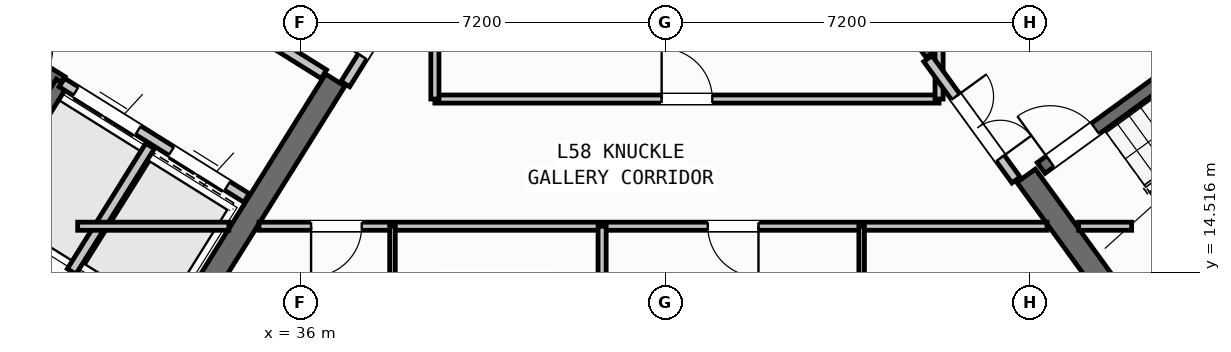
"""IFC4 building model, lengths in metres.
Left out: names, types, materials, properties, quantities, classifications, styles, units other than length and angle.
Written with IfcOpenShell. Run it as: python <this file> out.ifc"""

import sys

from ifc_helpers import new_model, si_unit, direction, frame, frame_2d, origin, place, context, subcontext, project, spatial, rectangle, extrude, source, transform, mapped, element, fill, save


model = new_model("IFC4")
c1 = context("Model", 3, precision=1e-05, world=origin(), true_north=direction((0.0, 1.0)))
c2 = subcontext(c1, "Body", "Model", "MODEL_VIEW")
j1 = project(units=[si_unit("LENGTHUNIT", "METRE"), si_unit("PLANEANGLEUNIT", "RADIAN")], contexts=[c1])
p1 = place(None, origin())
s1 = spatial("IfcSite", under=j1, at=p1, CompositionType="ELEMENT")
p2 = place(p1, origin())
s2 = spatial("IfcBuilding", under=s1, at=p2, CompositionType="ELEMENT")
p3 = place(p2, frame((0.0, 0.0, 229.2)))
s3 = spatial("IfcBuildingStorey", under=s2, at=p3, CompositionType="ELEMENT", Elevation=229.2)
p4 = place(p3, frame((33.324, 12.503, 0.0), z_axis=(0.0, 0.0, 1.0), x_axis=(-0.848043529849, 0.529926571782, 0.0)))
e1 = element("IfcWall", 1, at=p4, inside=s3, PredefinedType="SHEAR", context=c2, shape_type="SweptSolid", body=[
    extrude(rectangle(XDim=13.04, YDim=0.45, at=frame_2d((6.52, 0.0))), origin(), (0.0, 0.0, 1.0), 4.22),
])
p5 = place(p3, frame((36.683, 18.304, 0.0), z_axis=(0.0, 0.0, 1.0), x_axis=(-0.529904039071, -0.848057609704, 0.0)))
e2 = element("IfcWall", 2, at=p5, inside=s3, PredefinedType="SHEAR", context=c2, shape_type="SweptSolid", body=[
    extrude(rectangle(XDim=6.475, YDim=0.45, at=frame_2d((3.238, 0.0))), origin(), (0.0, 0.0, 1.0), 4.22),
])
p6 = place(p3, frame((52.399, 13.169, 0.0), z_axis=(0.0, 0.0, 1.0), x_axis=(0.809022352778, 0.587777877013, 0.0)))
e3 = element("IfcWall", 3, at=p6, inside=s3, PredefinedType="SHEAR", context=c2, shape_type="SweptSolid", body=[
    extrude(rectangle(XDim=12.24, YDim=0.45, at=frame_2d((6.12, 0.0))), origin(), (0.0, 0.0, 1.0), 4.22),
])
p7 = place(p3, frame((52.449, 13.483, 0.0), z_axis=(0.0, 0.0, 1.0), x_axis=(-0.587819244441, 0.808992296542, 0.0)))
e4 = element("IfcWall", 4, at=p7, inside=s3, PredefinedType="SHEAR", context=c2, shape_type="SweptSolid", body=[
    extrude(rectangle(XDim=3.625, YDim=0.45, at=frame_2d((1.812, 0.0))), origin(), (0.0, 0.0, 1.0), 4.22),
])
p8 = place(p3, frame((48.526, 18.884, 0.0), z_axis=(0.0, 0.0, 1.0), x_axis=(-0.587774812919, 0.809024578921, 0.0)))
e5 = element("IfcWall", 5, at=p8, inside=s3, PredefinedType="SHEAR", context=c2, shape_type="SweptSolid", body=[
    extrude(rectangle(XDim=6.475, YDim=0.45, at=frame_2d((3.238, 0.0))), origin(), (0.0, 0.0, 1.0), 4.22),
])
p9 = place(p3, frame((31.76, 12.183, 0.0), z_axis=(0.0, 0.0, 1.0), x_axis=(-0.848047074256, 0.529920899612, 0.0)))
e6 = element("IfcWall", 6, at=p9, inside=s3, PredefinedType="STANDARD", context=c2, shape_type="SweptSolid", body=[
    extrude(rectangle(XDim=30.652, YDim=0.32, at=frame_2d((15.326, 0.0))), origin(), (0.0, 0.0, 1.0), 4.22),
])
p10 = place(p9, frame((14.966, 0.0, 0.0)))
e7 = element("IfcOpeningElement", 7, at=p10, cuts=e6, PredefinedType="OPENING", context=c2, shape_type="SweptSolid", body=[
    extrude(rectangle(XDim=1.2, YDim=2.15, at=frame_2d((0.6, 1.075))), frame((0.0, 0.17, 0.0), z_axis=(0.0, -1.0, 0.0), x_axis=(1.0, 0.0, 0.0)), (0.0, 0.0, 1.0), 0.34),
])
p11 = place(p9, frame((2.096, 0.0, 0.9)))
e8 = element("IfcOpeningElement", 8, at=p11, cuts=e6, PredefinedType="OPENING", context=c2, shape_type="SweptSolid", body=[
    extrude(rectangle(XDim=1.65, YDim=1.45, at=frame_2d((0.825, 0.725))), frame((0.0, 0.17, 0.0), z_axis=(0.0, -1.0, 0.0), x_axis=(1.0, 0.0, 0.0)), (0.0, 0.0, 1.0), 0.34),
])
p12 = place(p9, frame((6.771, 0.0, 0.9)))
e9 = element("IfcOpeningElement", 9, at=p12, cuts=e6, PredefinedType="OPENING", context=c2, shape_type="SweptSolid", body=[
    extrude(rectangle(XDim=1.65, YDim=1.45, at=frame_2d((0.825, 0.725))), frame((0.0, 0.17, 0.0), z_axis=(0.0, -1.0, 0.0), x_axis=(1.0, 0.0, 0.0)), (0.0, 0.0, 1.0), 0.34),
])
p13 = place(p9, frame((20.283, 0.0, 0.95)))
e10 = element("IfcOpeningElement", 10, at=p13, cuts=e6, PredefinedType="OPENING", context=c2, shape_type="SweptSolid", body=[
    extrude(rectangle(XDim=1.95, YDim=1.35, at=frame_2d((0.975, 0.675))), frame((0.0, 0.17, 0.0), z_axis=(0.0, -1.0, 0.0), x_axis=(1.0, 0.0, 0.0)), (0.0, 0.0, 1.0), 0.34),
])
p14 = place(p9, frame((27.208, 0.0, 1.0)))
e11 = element("IfcOpeningElement", 11, at=p14, cuts=e6, PredefinedType="OPENING", context=c2, shape_type="SweptSolid", body=[
    extrude(rectangle(XDim=0.9, YDim=1.25, at=frame_2d((0.45, 0.625))), frame((0.0, 0.17, 0.0), z_axis=(0.0, -1.0, 0.0), x_axis=(1.0, 0.0, 0.0)), (0.0, 0.0, 1.0), 0.34),
])
p15 = place(p3, frame((31.28, 18.261, 0.0), z_axis=(0.0, 0.0, 1.0), x_axis=(-0.848051618787, 0.529913626805, 0.0)))
e12 = element("IfcWall", 12, at=p15, inside=s3, PredefinedType="SHEAR", context=c2, shape_type="SweptSolid", body=[
    extrude(rectangle(XDim=7.46, YDim=0.26, at=frame_2d((3.73, 0.0))), origin(), (0.0, 0.0, 1.0), 4.22),
])
p16 = place(p15, frame((0.36, 0.0, 0.0)))
e13 = element("IfcOpeningElement", 13, at=p16, cuts=e12, PredefinedType="OPENING", context=c2, shape_type="SweptSolid", body=[
    extrude(rectangle(XDim=0.86, YDim=2.05, at=frame_2d((0.43, 1.025))), frame((0.0, 0.14, 0.0), z_axis=(0.0, -1.0, 0.0), x_axis=(1.0, 0.0, 0.0)), (0.0, 0.0, 1.0), 0.28),
])
p17 = place(p3, frame((31.288, 18.256, 0.0), z_axis=(0.0, 0.0, 1.0), x_axis=(-0.529943379326, -0.848033026897, 0.0)))
e14 = element("IfcWall", 14, at=p17, inside=s3, PredefinedType="SHEAR", context=c2, shape_type="SweptSolid", body=[
    extrude(rectangle(XDim=3.16, YDim=0.26, at=frame_2d((1.58, 0.0))), origin(), (0.0, 0.0, 1.0), 4.22),
])
p18 = place(p3, frame((34.933, 15.978, 0.0), z_axis=(0.0, 0.0, 1.0), x_axis=(-0.848055739377, 0.529907032327, 0.0)))
e15 = element("IfcWall", 15, at=p18, inside=s3, PredefinedType="STANDARD", context=c2, shape_type="SweptSolid", body=[
    extrude(rectangle(XDim=4.298, YDim=0.2, at=frame_2d((2.149, 0.0))), origin(), (0.0, 0.0, 1.0), 4.21),
])
p19 = place(p18, frame((0.448, 0.0, 0.0)))
e16 = element("IfcOpeningElement", 16, at=p19, cuts=e15, PredefinedType="OPENING", context=c2, shape_type="SweptSolid", body=[
    extrude(rectangle(XDim=1.3, YDim=2.2, at=frame_2d((0.65, 1.1))), frame((0.0, 0.11, 0.0), z_axis=(0.0, -1.0, 0.0), x_axis=(1.0, 0.0, 0.0)), (0.0, 0.0, 1.0), 0.22),
])
p20 = place(p18, frame((2.523, 0.0, 0.0)))
e17 = element("IfcOpeningElement", 17, at=p20, cuts=e15, PredefinedType="OPENING", context=c2, shape_type="SweptSolid", body=[
    extrude(rectangle(XDim=1.45, YDim=2.25, at=frame_2d((0.725, 1.125))), frame((0.0, 0.11, 0.0), z_axis=(0.0, -1.0, 0.0), x_axis=(1.0, 0.0, 0.0)), (0.0, 0.0, 1.0), 0.22),
])
p21 = place(p3, frame((36.459, 18.421, 0.0), z_axis=(0.0, 0.0, 1.0), x_axis=(-0.848059591691, 0.529900867089, 0.0)))
e18 = element("IfcWall", 18, at=p21, inside=s3, PredefinedType="STANDARD", context=c2, shape_type="SweptSolid", body=[
    extrude(rectangle(XDim=5.818, YDim=0.2, at=frame_2d((2.909, 0.0))), origin(), (0.0, 0.0, 1.0), 4.21),
])
p22 = place(p21, frame((2.598, 0.0, 0.0)))
e19 = element("IfcOpeningElement", 19, at=p22, cuts=e18, PredefinedType="OPENING", context=c2, shape_type="SweptSolid", body=[
    extrude(rectangle(XDim=1.15, YDim=2.1, at=frame_2d((0.575, 1.05))), frame((0.0, 0.11, 0.0), z_axis=(0.0, -1.0, 0.0), x_axis=(1.0, 0.0, 0.0)), (0.0, 0.0, 1.0), 0.22),
])
p23 = place(p3, frame((33.029, 17.003, 0.0), z_axis=(0.0, 0.0, 1.0), x_axis=(-0.529916267533, -0.848049968695, 0.0)))
e20 = element("IfcWall", 20, at=p23, inside=s3, PredefinedType="STANDARD", context=c2, shape_type="SweptSolid", body=[
    extrude(rectangle(XDim=2.92, YDim=0.2, at=frame_2d((1.46, 0.0))), origin(), (0.0, 0.0, 1.0), 4.21),
])
p24 = place(p3, frame((52.472, 14.013, 0.0), z_axis=(0.0, 0.0, 1.0), x_axis=(0.809028366311, 0.587769599847, 0.0)))
e21 = element("IfcWall", 21, at=p24, inside=s3, PredefinedType="SHEAR", context=c2, shape_type="SweptSolid", body=[
    extrude(rectangle(XDim=7.33, YDim=0.26, at=frame_2d((3.665, 0.0))), origin(), (0.0, 0.0, 1.0), 4.22),
])
p25 = place(p3, frame((50.615, 16.57, 0.0), z_axis=(0.0, 0.0, 1.0), x_axis=(0.809028366311, 0.587769599847, 0.0)))
e22 = element("IfcWall", 22, at=p25, inside=s3, PredefinedType="SHEAR", context=c2, shape_type="SweptSolid", body=[
    extrude(rectangle(XDim=7.33, YDim=0.26, at=frame_2d((3.665, 0.0))), origin(), (0.0, 0.0, 1.0), 4.22),
])
p26 = place(p25, frame((0.22, 0.0, 0.0)))
e23 = element("IfcOpeningElement", 23, at=p26, cuts=e22, PredefinedType="OPENING", context=c2, shape_type="SweptSolid", body=[
    extrude(rectangle(XDim=1.1, YDim=2.1, at=frame_2d((0.55, 1.05))), frame((0.0, 0.14, 0.0), z_axis=(0.0, -1.0, 0.0), x_axis=(1.0, 0.0, 0.0)), (0.0, 0.0, 1.0), 0.28),
])
p27 = place(p3, frame((38.451, 20.737, 0.0), z_axis=(0.0, 0.0, 1.0), x_axis=(-0.529924799939, -0.848044637038, 0.0)))
e24 = element("IfcWall", 24, at=p27, inside=s3, PredefinedType="STANDARD", context=c2, shape_type="SweptSolid", body=[
    extrude(rectangle(XDim=2.96, YDim=0.2, at=frame_2d((1.48, 0.0))), origin(), (0.0, 0.0, 1.0), 2.395),
])
p28 = place(p27, frame((1.46, 0.0, 0.0)))
e25 = element("IfcOpeningElement", 25, at=p28, cuts=e24, PredefinedType="OPENING", context=c2, shape_type="SweptSolid", body=[
    extrude(rectangle(XDim=0.86, YDim=2.05, at=frame_2d((0.43, 1.025))), frame((0.0, 0.11, 0.0), z_axis=(0.0, -1.0, 0.0), x_axis=(1.0, 0.0, 0.0)), (0.0, 0.0, 1.0), 0.22),
])
p29 = place(p3, frame((31.6, 15.42, 0.0), z_axis=(0.0, 0.0, 1.0), x_axis=(1.0, 0.0, 0.0)))
e26 = element("IfcWall", 26, at=p29, inside=s3, PredefinedType="PARTITIONING", context=c2, shape_type="SweptSolid", body=[
    extrude(rectangle(XDim=2.984, YDim=0.16, at=frame_2d((1.492, 0.0))), origin(), (0.0, 0.0, 1.0), 4.21),
])
p30 = place(p3, frame((35.178, 15.42, 0.0), z_axis=(0.0, 0.0, 1.0), x_axis=(1.0, 0.0, 0.0)))
e27 = element("IfcWall", 27, at=p30, inside=s3, PredefinedType="PARTITIONING", context=c2, shape_type="SweptSolid", body=[
    extrude(rectangle(XDim=15.552, YDim=0.16, at=frame_2d((7.776, 0.0))), origin(), (0.0, 0.0, 1.0), 4.21),
])
p31 = place(p30, frame((1.028, 0.0, 0.0)))
e28 = element("IfcOpeningElement", 28, at=p31, cuts=e27, PredefinedType="OPENING", context=c2, shape_type="SweptSolid", body=[
    extrude(rectangle(XDim=1.0, YDim=2.1, at=frame_2d((0.5, 1.05))), frame((0.0, 0.09, 0.0), z_axis=(0.0, -1.0, 0.0), x_axis=(1.0, 0.0, 0.0)), (0.0, 0.0, 1.0), 0.18),
])
p32 = place(p30, frame((8.858, 0.0, 0.0)))
e29 = element("IfcOpeningElement", 29, at=p32, cuts=e27, PredefinedType="OPENING", context=c2, shape_type="SweptSolid", body=[
    extrude(rectangle(XDim=1.0, YDim=2.1, at=frame_2d((0.5, 1.05))), frame((0.0, 0.09, 0.0), z_axis=(0.0, -1.0, 0.0), x_axis=(1.0, 0.0, 0.0)), (0.0, 0.0, 1.0), 0.18),
])
p33 = place(p3, frame((51.354, 15.42, 0.0), z_axis=(0.0, 0.0, 1.0), x_axis=(1.0, 0.0, 0.0)))
e30 = element("IfcWall", 30, at=p33, inside=s3, PredefinedType="PARTITIONING", context=c2, shape_type="SweptSolid", body=[
    extrude(rectangle(XDim=1.046, YDim=0.16, at=frame_2d((0.523, 0.0))), origin(), (0.0, 0.0, 1.0), 4.21),
])
p34 = place(p3, frame((38.65, 17.93, 0.0), z_axis=(0.0, 0.0, 1.0), x_axis=(1.0, 0.0, 0.0)))
e31 = element("IfcWall", 31, at=p34, inside=s3, PredefinedType="PARTITIONING", context=c2, shape_type="SweptSolid", body=[
    extrude(rectangle(XDim=9.95, YDim=0.16, at=frame_2d((4.975, 0.0))), origin(), (0.0, 0.0, 1.0), 4.21),
])
p35 = place(p34, frame((4.475, 0.0, 0.0)))
e32 = element("IfcOpeningElement", 32, at=p35, cuts=e31, PredefinedType="OPENING", context=c2, shape_type="SweptSolid", body=[
    extrude(rectangle(XDim=1.0, YDim=2.1, at=frame_2d((0.5, 1.05))), frame((0.0, 0.09, 0.0), z_axis=(0.0, -1.0, 0.0), x_axis=(1.0, 0.0, 0.0)), (0.0, 0.0, 1.0), 0.18),
])
p36 = place(p3, frame((38.65, 17.93, 0.0), z_axis=(0.0, 0.0, 1.0), x_axis=(0.0, 1.0, 0.0)))
e33 = element("IfcWall", 33, at=p36, inside=s3, PredefinedType="PARTITIONING", context=c2, shape_type="SweptSolid", body=[
    extrude(rectangle(XDim=3.046, YDim=0.16, at=frame_2d((1.523, 0.0))), origin(), (0.0, 0.0, 1.0), 4.21),
])
p37 = place(p3, frame((48.6, 17.93, 0.0), z_axis=(0.0, 0.0, 1.0), x_axis=(0.0, 1.0, 0.0)))
e34 = element("IfcWall", 34, at=p37, inside=s3, PredefinedType="PARTITIONING", context=c2, shape_type="SweptSolid", body=[
    extrude(rectangle(XDim=0.993, YDim=0.16, at=frame_2d((0.496, 0.0))), origin(), (0.0, 0.0, 1.0), 4.21),
])
p38 = place(p3, frame((50.119, 16.333, 0.0), z_axis=(0.0, 0.0, 1.0), x_axis=(-0.587749856981, 0.809042709391, 0.0)))
e35 = element("IfcWall", 35, at=p38, inside=s3, PredefinedType="STANDARD", context=c2, shape_type="SweptSolid", body=[
    extrude(rectangle(XDim=2.96, YDim=0.2, at=frame_2d((1.48, 0.0))), origin(), (0.0, 0.0, 1.0), 2.395),
])
p39 = place(p38, frame((0.53, 0.0, 0.0)))
e36 = element("IfcOpeningElement", 36, at=p39, cuts=e35, PredefinedType="OPENING", context=c2, shape_type="SweptSolid", body=[
    extrude(rectangle(XDim=1.5, YDim=2.15, at=frame_2d((0.75, 1.075))), frame((0.0, 0.11, 0.0), z_axis=(0.0, -1.0, 0.0), x_axis=(1.0, 0.0, 0.0)), (0.0, 0.0, 1.0), 0.22),
])
p40 = place(p3, frame((41.95, 1.96, 0.0), z_axis=(0.0, 0.0, 1.0), x_axis=(0.0, 1.0, 0.0)))
e37 = element("IfcWall", 37, at=p40, inside=s3, PredefinedType="PARTITIONING", context=c2, shape_type="SweptSolid", body=[
    extrude(rectangle(XDim=13.46, YDim=0.16, at=frame_2d((6.73, 0.0))), origin(), (0.0, 0.0, 1.0), 4.21),
])
p41 = place(p3, frame((37.813, 1.96, 0.0), z_axis=(0.0, 0.0, 1.0), x_axis=(0.0, 1.0, 0.0)))
e38 = element("IfcWall", 38, at=p41, inside=s3, PredefinedType="PARTITIONING", context=c2, shape_type="SweptSolid", body=[
    extrude(rectangle(XDim=13.46, YDim=0.11, at=frame_2d((6.73, 0.0))), origin(), (0.0, 0.0, 1.0), 4.21),
])
p42 = place(p41, frame((5.5, 0.0, 0.0)))
e39 = element("IfcOpeningElement", 39, at=p42, cuts=e38, PredefinedType="OPENING", context=c2, shape_type="SweptSolid", body=[
    extrude(rectangle(XDim=0.92, YDim=2.08, at=frame_2d((0.46, 1.04))), frame((0.0, 0.065, 0.0), z_axis=(0.0, -1.0, 0.0), x_axis=(1.0, 0.0, 0.0)), (0.0, 0.0, 1.0), 0.13),
])
p43 = place(p41, frame((10.45, 0.0, 0.0)))
e40 = element("IfcOpeningElement", 40, at=p43, cuts=e38, PredefinedType="OPENING", context=c2, shape_type="SweptSolid", body=[
    extrude(rectangle(XDim=0.88, YDim=2.08, at=frame_2d((0.44, 1.04))), frame((0.0, 0.065, 0.0), z_axis=(0.0, -1.0, 0.0), x_axis=(1.0, 0.0, 0.0)), (0.0, 0.0, 1.0), 0.13),
])
p44 = place(p3, frame((47.072, 1.96, 0.0), z_axis=(0.0, 0.0, 1.0), x_axis=(0.0, 1.0, 0.0)))
e41 = element("IfcWall", 41, at=p44, inside=s3, PredefinedType="PARTITIONING", context=c2, shape_type="SweptSolid", body=[
    extrude(rectangle(XDim=13.46, YDim=0.11, at=frame_2d((6.73, 0.0))), origin(), (0.0, 0.0, 1.0), 4.21),
])
p45 = place(p44, frame((6.6, 0.0, 0.0)))
e42 = element("IfcOpeningElement", 42, at=p45, cuts=e41, PredefinedType="OPENING", context=c2, shape_type="SweptSolid", body=[
    extrude(rectangle(XDim=0.92, YDim=2.08, at=frame_2d((0.46, 1.04))), frame((0.0, 0.065, 0.0), z_axis=(0.0, -1.0, 0.0), x_axis=(1.0, 0.0, 0.0)), (0.0, 0.0, 1.0), 0.13),
])
p46 = place(p44, frame((11.1, 0.0, 0.0)))
e43 = element("IfcOpeningElement", 43, at=p46, cuts=e41, PredefinedType="OPENING", context=c2, shape_type="SweptSolid", body=[
    extrude(rectangle(XDim=0.88, YDim=2.08, at=frame_2d((0.44, 1.04))), frame((0.0, 0.065, 0.0), z_axis=(0.0, -1.0, 0.0), x_axis=(1.0, 0.0, 0.0)), (0.0, 0.0, 1.0), 0.13),
])
m1 = source(origin(), c2, "Body", "SweptSolid", [
    extrude(rectangle(XDim=1.3, YDim=2.2, at=frame_2d((0.65, 1.1))), frame((0.0, 0.025, 0.0), z_axis=(0.0, -1.0, 0.0), x_axis=(1.0, 0.0, 0.0)), (0.0, 0.0, 1.0), 0.05),
])
p47 = place(p19, origin())
e44 = element("IfcDoor", 44, at=p47, inside=s3, OperationType="DOUBLE_DOOR_SLIDING", PredefinedType="DOOR", context=c2, shape_type="MappedRepresentation", body=[
    mapped(m1, transform((0.0, 0.0, 0.0), scale=1.0)),
])
fill(e16, e44)
m2 = source(origin(), c2, "Body", "SweptSolid", [
    extrude(rectangle(XDim=1.45, YDim=2.25, at=frame_2d((0.725, 1.125))), frame((0.0, 0.025, 0.0), z_axis=(0.0, -1.0, 0.0), x_axis=(1.0, 0.0, 0.0)), (0.0, 0.0, 1.0), 0.05),
])
p48 = place(p20, origin())
e45 = element("IfcDoor", 45, at=p48, inside=s3, OperationType="DOUBLE_DOOR_SLIDING", PredefinedType="DOOR", context=c2, shape_type="MappedRepresentation", body=[
    mapped(m2, transform((0.0, 0.0, 0.0), scale=1.0)),
])
fill(e17, e45)
m3 = source(origin(), c2, "Body", "SweptSolid", [
    extrude(rectangle(XDim=1.1, YDim=2.1, at=frame_2d((0.55, 1.05))), frame((0.0, 0.025, 0.0), z_axis=(0.0, -1.0, 0.0), x_axis=(1.0, 0.0, 0.0)), (0.0, 0.0, 1.0), 0.05),
])
p49 = place(p26, origin())
e46 = element("IfcDoor", 46, at=p49, inside=s3, OperationType="SINGLE_SWING_LEFT", PredefinedType="DOOR", context=c2, shape_type="MappedRepresentation", body=[
    mapped(m3, transform((0.0, 0.0, 0.0), scale=1.0)),
])
fill(e23, e46)
m4 = source(origin(), c2, "Body", "SweptSolid", [
    extrude(rectangle(XDim=1.0, YDim=2.1, at=frame_2d((0.5, 1.05))), frame((0.0, 0.025, 0.0), z_axis=(0.0, -1.0, 0.0), x_axis=(1.0, 0.0, 0.0)), (0.0, 0.0, 1.0), 0.05),
])
p50 = place(p35, origin())
e47 = element("IfcDoor", 47, at=p50, inside=s3, OperationType="SINGLE_SWING_LEFT", PredefinedType="DOOR", context=c2, shape_type="MappedRepresentation", body=[
    mapped(m4, transform((0.0, 0.0, 0.0), scale=1.0)),
])
fill(e32, e47)
m5 = source(origin(), c2, "Body", "SweptSolid", [
    extrude(rectangle(XDim=0.86, YDim=2.05, at=frame_2d((0.43, 1.025))), frame((0.0, 0.025, 0.0), z_axis=(0.0, -1.0, 0.0), x_axis=(1.0, 0.0, 0.0)), (0.0, 0.0, 1.0), 0.05),
])
p51 = place(p28, frame((0.86, 0.0, 0.0), z_axis=(0.0, 0.0, 1.0), x_axis=(-1.0, 0.0, 0.0)))
e48 = element("IfcDoor", 48, at=p51, inside=s3, OperationType="SINGLE_SWING_LEFT", PredefinedType="DOOR", context=c2, shape_type="MappedRepresentation", body=[
    mapped(m5, transform((0.0, 0.0, 0.0), scale=1.0)),
])
fill(e25, e48)
m6 = source(origin(), c2, "Body", "SweptSolid", [
    extrude(rectangle(XDim=1.5, YDim=2.15, at=frame_2d((0.75, 1.075))), frame((0.0, 0.025, 0.0), z_axis=(0.0, -1.0, 0.0), x_axis=(1.0, 0.0, 0.0)), (0.0, 0.0, 1.0), 0.05),
])
p52 = place(p39, frame((1.5, 0.0, 0.0), z_axis=(0.0, 0.0, 1.0), x_axis=(-1.0, 0.0, 0.0)))
e49 = element("IfcDoor", 49, at=p52, inside=s3, OperationType="DOUBLE_DOOR_SINGLE_SWING", PredefinedType="DOOR", context=c2, shape_type="MappedRepresentation", body=[
    mapped(m6, transform((0.0, 0.0, 0.0), scale=1.0)),
])
fill(e36, e49)
p53 = place(p31, frame((1.0, 0.0, 0.0), z_axis=(0.0, 0.0, 1.0), x_axis=(-1.0, 0.0, 0.0)))
e50 = element("IfcDoor", 50, at=p53, inside=s3, OperationType="SINGLE_SWING_RIGHT", PredefinedType="DOOR", context=c2, shape_type="MappedRepresentation", body=[
    mapped(m4, transform((0.0, 0.0, 0.0), scale=1.0)),
])
fill(e28, e50)
p54 = place(p32, frame((1.0, 0.0, 0.0), z_axis=(0.0, 0.0, 1.0), x_axis=(-1.0, 0.0, 0.0)))
e51 = element("IfcDoor", 51, at=p54, inside=s3, OperationType="SINGLE_SWING_LEFT", PredefinedType="DOOR", context=c2, shape_type="MappedRepresentation", body=[
    mapped(m4, transform((0.0, 0.0, 0.0), scale=1.0)),
])
fill(e29, e51)
save(model, sys.argv[1])
